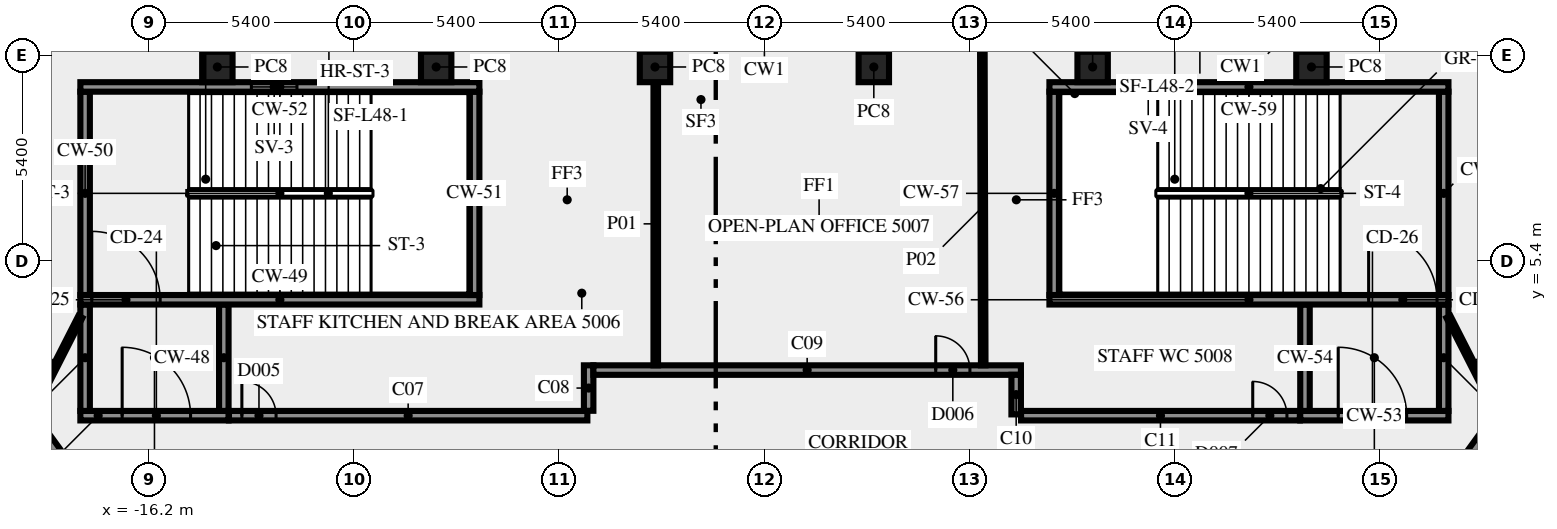
"""IFC4 building model, lengths in metres.
Left out: names, types, materials, properties, quantities, classifications, styles, units other than length and angle.
Written with IfcOpenShell. Run it as: python <this file> out.ifc"""

import sys

from ifc_helpers import new_model, si_unit, direction, frame, frame_2d, origin, origin_2d, place, context, subcontext, project, spatial, rectangle, extrude, element, fill, save


model = new_model("IFC4")
c1 = context("Model", 3, precision=1e-05, world=origin(), true_north=direction((0.0, 1.0)))
c2 = subcontext(c1, "Body", "Model", "MODEL_VIEW")
j1 = project(units=[si_unit("LENGTHUNIT", "METRE"), si_unit("PLANEANGLEUNIT", "RADIAN")], contexts=[c1])
p1 = place(None, origin())
s1 = spatial("IfcSite", under=j1, at=p1, CompositionType="ELEMENT")
p2 = place(p1, origin())
s2 = spatial("IfcBuilding", under=s1, at=p2, CompositionType="ELEMENT")
p3 = place(p2, frame((0.0, 0.0, 214.0)))
s3 = spatial("IfcBuildingStorey", under=s2, at=p3, CompositionType="ELEMENT", Elevation=214.0)
for number, where, z_axis, x_axis in (
    (1, (14.395, 10.5, 0.0), (0.0, 0.0, 1.0), (-1.0, 0.0, 0.0)),
    (2, (8.637, 10.5, 0.0), (0.0, 0.0, 1.0), (-1.0, 0.0, 0.0)),
    (3, (2.879, 10.5, 0.0), (0.0, 0.0, 1.0), (-1.0, 0.0, 0.0)),
    (4, (-2.879, 10.5, 0.0), (0.0, 0.0, 1.0), (-1.0, 0.0, 0.0)),
    (5, (-8.637, 10.5, 0.0), (0.0, 0.0, 1.0), (-1.0, 0.0, 0.0)),
    (6, (-14.395, 10.5, 0.0), (0.0, 0.0, 1.0), (-1.0, 0.0, 0.0)),
):
    element("IfcColumn", number, at=place(p3, frame(where, z_axis=z_axis, x_axis=x_axis)), inside=s3, PredefinedType="COLUMN", context=c2, shape_type="SweptSolid", body=[
        extrude(rectangle(XDim=0.8, YDim=0.8, at=origin_2d()), origin(), (0.0, 0.0, 1.0), 3.65),
    ])
p4 = place(p3, frame((-18.0, 1.325, 0.0), z_axis=(0.0, 0.0, 1.0), x_axis=(1.0, 0.0, 0.0)))
e7 = element("IfcWall", 7, at=p4, inside=s3, PredefinedType="SHEAR", context=c2, shape_type="SweptSolid", body=[
    extrude(rectangle(XDim=3.9, YDim=0.25, at=frame_2d((1.95, 0.0))), origin(), (0.0, 0.0, 1.0), 3.65),
])
p5 = place(p4, frame((1.1, 0.0, 0.0)))
e8 = element("IfcOpeningElement", 8, at=p5, cuts=e7, PredefinedType="OPENING", context=c2, shape_type="SweptSolid", body=[
    extrude(rectangle(XDim=1.8, YDim=2.1, at=frame_2d((0.9, 1.05))), frame((0.0, 0.135, 0.0), z_axis=(0.0, -1.0, 0.0), x_axis=(1.0, 0.0, 0.0)), (0.0, 0.0, 1.0), 0.27),
])
for number, where, z_axis, x_axis in (
    (9, (-17.875, 1.45, 0.0), (0.0, 0.0, 1.0), (0.0, 1.0, 0.0)),
    (10, (-14.225, 1.45, 0.0), (0.0, 0.0, 1.0), (0.0, 1.0, 0.0)),
):
    element("IfcWall", number, at=place(p3, frame(where, z_axis=z_axis, x_axis=x_axis)), inside=s3, PredefinedType="SHEAR", context=c2, shape_type="SweptSolid", body=[
        extrude(rectangle(XDim=2.8, YDim=0.25, at=frame_2d((1.4, 0.0))), origin(), (0.0, 0.0, 1.0), 3.65),
    ])
p6 = place(p3, frame((-18.0, 4.375, 0.0), z_axis=(0.0, 0.0, 1.0), x_axis=(1.0, 0.0, 0.0)))
e11 = element("IfcWall", 11, at=p6, inside=s3, PredefinedType="SHEAR", context=c2, shape_type="SweptSolid", body=[
    extrude(rectangle(XDim=10.5, YDim=0.25, at=frame_2d((5.25, 0.0))), origin(), (0.0, 0.0, 1.0), 3.65),
])
p7 = place(p6, frame((0.3, 0.0, 0.0)))
e12 = element("IfcOpeningElement", 12, at=p7, cuts=e11, PredefinedType="OPENING", context=c2, shape_type="SweptSolid", body=[
    extrude(rectangle(XDim=1.8, YDim=2.1, at=frame_2d((0.9, 1.05))), frame((0.0, 0.135, 0.0), z_axis=(0.0, -1.0, 0.0), x_axis=(1.0, 0.0, 0.0)), (0.0, 0.0, 1.0), 0.27),
])
for number, where, z_axis, x_axis in (
    (13, (-17.875, 4.5, 0.0), (0.0, 0.0, 1.0), (0.0, 1.0, 0.0)),
    (14, (-7.625, 4.5, 0.0), (0.0, 0.0, 1.0), (0.0, 1.0, 0.0)),
):
    element("IfcWall", number, at=place(p3, frame(where, z_axis=z_axis, x_axis=x_axis)), inside=s3, PredefinedType="SHEAR", context=c2, shape_type="SweptSolid", body=[
        extrude(rectangle(XDim=5.35, YDim=0.25, at=frame_2d((2.675, 0.0))), origin(), (0.0, 0.0, 1.0), 3.65),
    ])
p8 = place(p3, frame((-18.0, 9.975, 0.0), z_axis=(0.0, 0.0, 1.0), x_axis=(1.0, 0.0, 0.0)))
e15 = element("IfcWall", 15, at=p8, inside=s3, PredefinedType="SHEAR", context=c2, shape_type="SweptSolid", body=[
    extrude(rectangle(XDim=10.5, YDim=0.25, at=frame_2d((5.25, 0.0))), origin(), (0.0, 0.0, 1.0), 3.65),
])
p9 = place(p8, frame((4.5, 0.0, 1.0)))
e16 = element("IfcOpeningElement", 16, at=p9, cuts=e15, PredefinedType="OPENING", context=c2, shape_type="SweptSolid", body=[
    extrude(rectangle(XDim=1.2, YDim=1.2, at=frame_2d((0.6, 0.6))), frame((0.0, 0.135, 0.0), z_axis=(0.0, -1.0, 0.0), x_axis=(1.0, 0.0, 0.0)), (0.0, 0.0, 1.0), 0.27),
])
p10 = place(p3, frame((14.1, 1.325, 0.0), z_axis=(0.0, 0.0, 1.0), x_axis=(1.0, 0.0, 0.0)))
e17 = element("IfcWall", 17, at=p10, inside=s3, PredefinedType="SHEAR", context=c2, shape_type="SweptSolid", body=[
    extrude(rectangle(XDim=3.9, YDim=0.25, at=frame_2d((1.95, 0.0))), origin(), (0.0, 0.0, 1.0), 3.65),
])
p11 = place(p10, frame((1.0, 0.0, 0.0)))
e18 = element("IfcOpeningElement", 18, at=p11, cuts=e17, PredefinedType="OPENING", context=c2, shape_type="SweptSolid", body=[
    extrude(rectangle(XDim=1.8, YDim=2.1, at=frame_2d((0.9, 1.05))), frame((0.0, 0.135, 0.0), z_axis=(0.0, -1.0, 0.0), x_axis=(1.0, 0.0, 0.0)), (0.0, 0.0, 1.0), 0.27),
])
for number, where, z_axis, x_axis in (
    (19, (14.225, 1.45, 0.0), (0.0, 0.0, 1.0), (0.0, 1.0, 0.0)),
    (20, (17.875, 1.45, 0.0), (0.0, 0.0, 1.0), (0.0, 1.0, 0.0)),
):
    element("IfcWall", number, at=place(p3, frame(where, z_axis=z_axis, x_axis=x_axis)), inside=s3, PredefinedType="SHEAR", context=c2, shape_type="SweptSolid", body=[
        extrude(rectangle(XDim=2.8, YDim=0.25, at=frame_2d((1.4, 0.0))), origin(), (0.0, 0.0, 1.0), 3.65),
    ])
p12 = place(p3, frame((7.5, 4.375, 0.0), z_axis=(0.0, 0.0, 1.0), x_axis=(1.0, 0.0, 0.0)))
e21 = element("IfcWall", 21, at=p12, inside=s3, PredefinedType="SHEAR", context=c2, shape_type="SweptSolid", body=[
    extrude(rectangle(XDim=10.5, YDim=0.25, at=frame_2d((5.25, 0.0))), origin(), (0.0, 0.0, 1.0), 3.65),
])
p13 = place(p12, frame((8.4, 0.0, 0.0)))
e22 = element("IfcOpeningElement", 22, at=p13, cuts=e21, PredefinedType="OPENING", context=c2, shape_type="SweptSolid", body=[
    extrude(rectangle(XDim=1.8, YDim=2.1, at=frame_2d((0.9, 1.05))), frame((0.0, 0.135, 0.0), z_axis=(0.0, -1.0, 0.0), x_axis=(1.0, 0.0, 0.0)), (0.0, 0.0, 1.0), 0.27),
])
for number, where, z_axis, x_axis in (
    (23, (7.625, 4.5, 0.0), (0.0, 0.0, 1.0), (0.0, 1.0, 0.0)),
    (24, (17.875, 4.5, 0.0), (0.0, 0.0, 1.0), (0.0, 1.0, 0.0)),
):
    element("IfcWall", number, at=place(p3, frame(where, z_axis=z_axis, x_axis=x_axis)), inside=s3, PredefinedType="SHEAR", context=c2, shape_type="SweptSolid", body=[
        extrude(rectangle(XDim=5.35, YDim=0.25, at=frame_2d((2.675, 0.0))), origin(), (0.0, 0.0, 1.0), 3.65),
    ])
p14 = place(p3, frame((7.5, 9.975, 0.0), z_axis=(0.0, 0.0, 1.0), x_axis=(1.0, 0.0, 0.0)))
e25 = element("IfcWall", 25, at=p14, inside=s3, PredefinedType="SHEAR", context=c2, shape_type="SweptSolid", body=[
    extrude(rectangle(XDim=10.5, YDim=0.25, at=frame_2d((5.25, 0.0))), origin(), (0.0, 0.0, 1.0), 3.65),
])
p15 = place(p14, frame((2.0, 0.0, 1.0)))
e26 = element("IfcOpeningElement", 26, at=p15, cuts=e25, PredefinedType="OPENING", context=c2, shape_type="SweptSolid", body=[
    extrude(rectangle(XDim=1.2, YDim=1.2, at=frame_2d((0.6, 0.6))), frame((0.0, 0.135, 0.0), z_axis=(0.0, -1.0, 0.0), x_axis=(1.0, 0.0, 0.0)), (0.0, 0.0, 1.0), 0.27),
])
p16 = place(p3, frame((17.545, -1.125, 0.0), z_axis=(0.0, 0.0, 1.0), x_axis=(0.58779555165, 0.809009511354, 0.0)))
e27 = element("IfcWall", 27, at=p16, inside=s3, PredefinedType="SOLIDWALL", context=c2, shape_type="SweptSolid", body=[
    extrude(rectangle(XDim=18.103, YDim=0.25, at=frame_2d((9.052, 0.0))), origin(), (0.0, 0.0, 1.0), 3.65),
])
p17 = place(p16, frame((16.728, 0.0, 0.0)))
e28 = element("IfcOpeningElement", 28, at=p17, cuts=e27, PredefinedType="OPENING", context=c2, shape_type="SweptSolid", body=[
    extrude(rectangle(XDim=0.9, YDim=2.1, at=frame_2d((0.45, 1.05))), frame((0.0, 0.135, 0.0), z_axis=(0.0, -1.0, 0.0), x_axis=(1.0, 0.0, 0.0)), (0.0, 0.0, 1.0), 0.27),
])
p18 = place(p3, frame((-31.918, 18.658, 0.0), z_axis=(0.0, 0.0, 1.0), x_axis=(0.587788731405, -0.80901446664, 0.0)))
e29 = element("IfcWall", 29, at=p18, inside=s3, PredefinedType="SOLIDWALL", context=c2, shape_type="SweptSolid", body=[
    extrude(rectangle(XDim=24.453, YDim=0.25, at=frame_2d((12.227, 0.0))), origin(), (0.0, 0.0, 1.0), 3.65),
])
p19 = place(p18, frame((20.112, 0.0, 0.0)))
e30 = element("IfcOpeningElement", 30, at=p19, cuts=e29, PredefinedType="OPENING", context=c2, shape_type="SweptSolid", body=[
    extrude(rectangle(XDim=0.9, YDim=2.1, at=frame_2d((0.45, 1.05))), frame((0.0, 0.135, 0.0), z_axis=(0.0, -1.0, 0.0), x_axis=(1.0, 0.0, 0.0)), (0.0, 0.0, 1.0), 0.27),
])
p20 = place(p18, frame((4.445, 0.0, 0.0)))
e31 = element("IfcOpeningElement", 31, at=p20, cuts=e29, PredefinedType="OPENING", context=c2, shape_type="SweptSolid", body=[
    extrude(rectangle(XDim=0.9, YDim=2.1, at=frame_2d((0.45, 1.05))), frame((0.0, 0.135, 0.0), z_axis=(0.0, -1.0, 0.0), x_axis=(1.0, 0.0, 0.0)), (0.0, 0.0, 1.0), 0.27),
])
p21 = place(p3, frame((-14.09, 1.325, 0.0), z_axis=(0.0, 0.0, 1.0), x_axis=(1.0, 0.0, 0.0)))
e32 = element("IfcWall", 32, at=p21, inside=s3, PredefinedType="SOLIDWALL", context=c2, shape_type="SweptSolid", body=[
    extrude(rectangle(XDim=9.431, YDim=0.25, at=frame_2d((4.716, 0.0))), origin(), (0.0, 0.0, 1.0), 3.65),
])
p22 = place(p21, frame((0.34, 0.0, 0.0)))
e33 = element("IfcOpeningElement", 33, at=p22, cuts=e32, PredefinedType="OPENING", context=c2, shape_type="SweptSolid", body=[
    extrude(rectangle(XDim=0.9, YDim=2.1, at=frame_2d((0.45, 1.05))), frame((0.0, 0.135, 0.0), z_axis=(0.0, -1.0, 0.0), x_axis=(1.0, 0.0, 0.0)), (0.0, 0.0, 1.0), 0.27),
])
p23 = place(p3, frame((-4.625, 1.454, 0.0), z_axis=(0.0, 0.0, 1.0), x_axis=(0.0, 1.0, 0.0)))
e34 = element("IfcWall", 34, at=p23, inside=s3, PredefinedType="SOLIDWALL", context=c2, shape_type="SweptSolid", body=[
    extrude(rectangle(XDim=1.196, YDim=0.25, at=frame_2d((0.598, 0.0))), origin(), (0.0, 0.0, 1.0), 3.65),
])
p24 = place(p3, frame((-4.5, 2.525, 0.0), z_axis=(0.0, 0.0, 1.0), x_axis=(1.0, 0.0, 0.0)))
e35 = element("IfcWall", 35, at=p24, inside=s3, PredefinedType="SOLIDWALL", context=c2, shape_type="SweptSolid", body=[
    extrude(rectangle(XDim=11.25, YDim=0.25, at=frame_2d((5.625, 0.0))), origin(), (0.0, 0.0, 1.0), 3.65),
])
p25 = place(p24, frame((9.008, 0.0, 0.0)))
e36 = element("IfcOpeningElement", 36, at=p25, cuts=e35, PredefinedType="OPENING", context=c2, shape_type="SweptSolid", body=[
    extrude(rectangle(XDim=0.9, YDim=2.1, at=frame_2d((0.45, 1.05))), frame((0.0, 0.135, 0.0), z_axis=(0.0, -1.0, 0.0), x_axis=(1.0, 0.0, 0.0)), (0.0, 0.0, 1.0), 0.27),
])
p26 = place(p3, frame((6.625, 2.4, 0.0), z_axis=(0.0, 0.0, 1.0), x_axis=(0.0, -1.0, 0.0)))
e37 = element("IfcWall", 37, at=p26, inside=s3, PredefinedType="SOLIDWALL", context=c2, shape_type="SweptSolid", body=[
    extrude(rectangle(XDim=1.041, YDim=0.25, at=frame_2d((0.521, 0.0))), origin(), (0.0, 0.0, 1.0), 3.65),
])
p27 = place(p3, frame((6.754, 1.325, 0.0), z_axis=(0.0, 0.0, 1.0), x_axis=(1.0, 0.0, 0.0)))
e38 = element("IfcWall", 38, at=p27, inside=s3, PredefinedType="SOLIDWALL", context=c2, shape_type="SweptSolid", body=[
    extrude(rectangle(XDim=7.336, YDim=0.25, at=frame_2d((3.668, 0.0))), origin(), (0.0, 0.0, 1.0), 3.65),
])
p28 = place(p27, frame((6.096, 0.0, 0.0)))
e39 = element("IfcOpeningElement", 39, at=p28, cuts=e38, PredefinedType="OPENING", context=c2, shape_type="SweptSolid", body=[
    extrude(rectangle(XDim=0.9, YDim=2.1, at=frame_2d((0.45, 1.05))), frame((0.0, 0.135, 0.0), z_axis=(0.0, -1.0, 0.0), x_axis=(1.0, 0.0, 0.0)), (0.0, 0.0, 1.0), 0.27),
])
p29 = place(p3, frame((-2.859, 10.095, 0.0), z_axis=(0.0, 0.0, 1.0), x_axis=(0.0, -1.0, 0.0)))
e40 = element("IfcWall", 40, at=p29, inside=s3, PredefinedType="PARTITIONING", context=c2, shape_type="SweptSolid", body=[
    extrude(rectangle(XDim=7.445, YDim=0.12, at=frame_2d((3.723, 0.0))), origin(), (0.0, 0.0, 1.0), 3.65),
])
p30 = place(p3, frame((5.758, 2.65, 0.0), z_axis=(0.0, 0.0, 1.0), x_axis=(-0.002748366908, 0.999996223233, 0.0)))
e41 = element("IfcWall", 41, at=p30, inside=s3, PredefinedType="PARTITIONING", context=c2, shape_type="SweptSolid", body=[
    extrude(rectangle(XDim=8.35, YDim=0.12, at=frame_2d((4.175, 0.0))), origin(), (0.0, 0.0, 1.0), 2.85),
])
for number, where, z_axis, x_axis in (
    (42, (-19.261, 1.45, 0.0), (0.0, 0.0, 1.0), (0.454, 0.891, 0.0)),
    (43, (18.0, 3.925, 0.0), (0.0, 0.0, 1.0), (0.454, -0.891, 0.0)),
):
    element("IfcWall", number, at=place(p3, frame(where, z_axis=z_axis, x_axis=x_axis)), inside=s3, PredefinedType="PARTITIONING", context=c2, shape_type="SweptSolid", body=[
        extrude(rectangle(XDim=2.778, YDim=0.12, at=frame_2d((1.389, 0.0))), origin(), (0.0, 0.0, 1.0), 3.65),
    ])
p31 = place(p5, origin())
e44 = element("IfcDoor", 44, at=p31, inside=s3, OperationType="DOUBLE_DOOR_SINGLE_SWING", PredefinedType="DOOR", context=c2, shape_type="SweptSolid", body=[
    extrude(rectangle(XDim=1.8, YDim=2.1, at=frame_2d((0.9, 1.05))), frame((0.0, 0.025, 0.0), z_axis=(0.0, -1.0, 0.0), x_axis=(1.0, 0.0, 0.0)), (0.0, 0.0, 1.0), 0.05),
])
fill(e8, e44)
p32 = place(p7, origin())
e45 = element("IfcDoor", 45, at=p32, inside=s3, OperationType="DOUBLE_DOOR_SINGLE_SWING", PredefinedType="DOOR", context=c2, shape_type="SweptSolid", body=[
    extrude(rectangle(XDim=1.8, YDim=2.1, at=frame_2d((0.9, 1.05))), frame((0.0, 0.025, 0.0), z_axis=(0.0, -1.0, 0.0), x_axis=(1.0, 0.0, 0.0)), (0.0, 0.0, 1.0), 0.05),
])
fill(e12, e45)
p33 = place(p9, origin())
e46 = element("IfcWindow", 46, at=p33, inside=s3, PartitioningType="SINGLE_PANEL", PredefinedType="WINDOW", context=c2, shape_type="SweptSolid", body=[
    extrude(rectangle(XDim=1.2, YDim=1.2, at=frame_2d((0.6, 0.6))), frame((0.0, 0.03, 0.0), z_axis=(0.0, -1.0, 0.0), x_axis=(1.0, 0.0, 0.0)), (0.0, 0.0, 1.0), 0.06),
])
fill(e16, e46)
p34 = place(p11, origin())
e47 = element("IfcDoor", 47, at=p34, inside=s3, OperationType="DOUBLE_DOOR_SINGLE_SWING", PredefinedType="DOOR", context=c2, shape_type="SweptSolid", body=[
    extrude(rectangle(XDim=1.8, YDim=2.1, at=frame_2d((0.9, 1.05))), frame((0.0, 0.025, 0.0), z_axis=(0.0, -1.0, 0.0), x_axis=(1.0, 0.0, 0.0)), (0.0, 0.0, 1.0), 0.05),
])
fill(e18, e47)
p35 = place(p13, origin())
e48 = element("IfcDoor", 48, at=p35, inside=s3, OperationType="DOUBLE_DOOR_SINGLE_SWING", PredefinedType="DOOR", context=c2, shape_type="SweptSolid", body=[
    extrude(rectangle(XDim=1.8, YDim=2.1, at=frame_2d((0.9, 1.05))), frame((0.0, 0.025, 0.0), z_axis=(0.0, -1.0, 0.0), x_axis=(1.0, 0.0, 0.0)), (0.0, 0.0, 1.0), 0.05),
])
fill(e22, e48)
p36 = place(p15, origin())
e49 = element("IfcWindow", 49, at=p36, inside=s3, PartitioningType="SINGLE_PANEL", PredefinedType="WINDOW", context=c2, shape_type="SweptSolid", body=[
    extrude(rectangle(XDim=1.2, YDim=1.2, at=frame_2d((0.6, 0.6))), frame((0.0, 0.03, 0.0), z_axis=(0.0, -1.0, 0.0), x_axis=(1.0, 0.0, 0.0)), (0.0, 0.0, 1.0), 0.06),
])
fill(e26, e49)
p37 = place(p25, origin())
e50 = element("IfcDoor", 50, at=p37, inside=s3, OperationType="SINGLE_SWING_RIGHT", PredefinedType="DOOR", context=c2, shape_type="SweptSolid", body=[
    extrude(rectangle(XDim=0.9, YDim=2.1, at=frame_2d((0.45, 1.05))), frame((0.0, 0.025, 0.0), z_axis=(0.0, -1.0, 0.0), x_axis=(1.0, 0.0, 0.0)), (0.0, 0.0, 1.0), 0.05),
])
fill(e36, e50)
p38 = place(p22, origin())
e51 = element("IfcDoor", 51, at=p38, inside=s3, OperationType="SINGLE_SWING_LEFT", PredefinedType="DOOR", context=c2, shape_type="SweptSolid", body=[
    extrude(rectangle(XDim=0.9, YDim=2.1, at=frame_2d((0.45, 1.05))), frame((0.0, 0.025, 0.0), z_axis=(0.0, -1.0, 0.0), x_axis=(1.0, 0.0, 0.0)), (0.0, 0.0, 1.0), 0.05),
])
fill(e33, e51)
p39 = place(p28, origin())
e52 = element("IfcDoor", 52, at=p39, inside=s3, OperationType="SINGLE_SWING_RIGHT", PredefinedType="DOOR", context=c2, shape_type="SweptSolid", body=[
    extrude(rectangle(XDim=0.9, YDim=2.1, at=frame_2d((0.45, 1.05))), frame((0.0, 0.025, 0.0), z_axis=(0.0, -1.0, 0.0), x_axis=(1.0, 0.0, 0.0)), (0.0, 0.0, 1.0), 0.05),
])
fill(e39, e52)
save(model, sys.argv[1])
